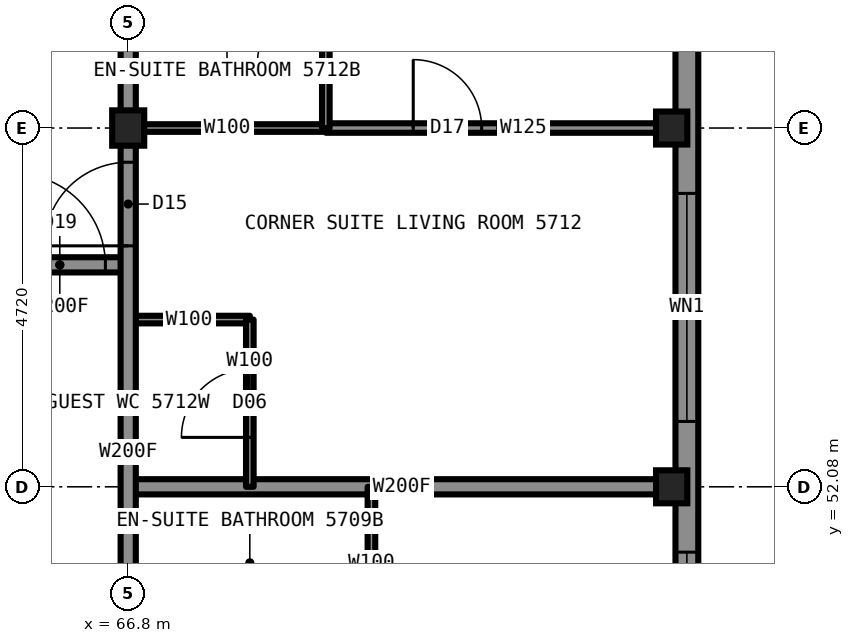
"""IFC4 building model, lengths in metres.
Left out: names, types, materials, properties, quantities, classifications, styles, units other than length and angle.
Written with IfcOpenShell. Run it as: python <this file> out.ifc"""

import sys

from ifc_helpers import new_model, si_unit, direction, frame, frame_2d, origin, origin_2d, place, context, subcontext, project, spatial, rectangle, i_section, extrude, element, fill, save


model = new_model("IFC4")
c1 = context("Model", 3, precision=1e-05, world=origin(), true_north=direction((0.0, 1.0)))
c2 = subcontext(c1, "Body", "Model", "MODEL_VIEW")
j1 = project(units=[si_unit("LENGTHUNIT", "METRE"), si_unit("PLANEANGLEUNIT", "RADIAN")], contexts=[c1])
p1 = place(None, origin())
s1 = spatial("IfcSite", under=j1, at=p1, CompositionType="ELEMENT")
p2 = place(p1, origin())
s2 = spatial("IfcBuilding", under=s1, at=p2, CompositionType="ELEMENT")
p3 = place(p2, frame((0.0, 0.0, 203.8)))
s3 = spatial("IfcBuildingStorey", under=s2, at=p3, CompositionType="ELEMENT", Elevation=203.8)
for number, where, z_axis, x_axis in (
    (1, (73.95, 52.08, 0.0), (0.0, 0.0, 1.0), (1.0, 0.0, 0.0)),
    (2, (73.95, 56.8, 0.0), (0.0, 0.0, 1.0), (1.0, 0.0, 0.0)),
):
    element("IfcColumn", number, at=place(p3, frame(where, z_axis=z_axis, x_axis=x_axis)), inside=s3, PredefinedType="COLUMN", context=c2, shape_type="SweptSolid", body=[
        extrude(i_section(OverallWidth=0.411, OverallDepth=0.434, WebThickness=0.036, FlangeThickness=0.057, at=origin_2d()), origin(), (0.0, 0.0, 1.0), 3.5),
    ])
p4 = place(p3, frame((66.8, 56.8, 0.0), z_axis=(0.0, 0.0, 1.0), x_axis=(1.0, 0.0, 0.0)))
e3 = element("IfcColumn", 3, at=p4, inside=s3, PredefinedType="COLUMN", context=c2, shape_type="SweptSolid", body=[
    extrude(i_section(OverallWidth=0.422, OverallDepth=0.465, WebThickness=0.045, FlangeThickness=0.073, at=origin_2d()), origin(), (0.0, 0.0, 1.0), 3.5),
])
p5 = place(p3, frame((65.0, 55.0, 0.0), z_axis=(0.0, 0.0, 1.0), x_axis=(1.0, 0.0, 0.0)))
e4 = element("IfcWall", 4, at=p5, inside=s3, PredefinedType="PARTITIONING", context=c2, shape_type="SweptSolid", body=[
    extrude(rectangle(XDim=1.8, YDim=0.2, at=frame_2d((0.9, 0.0))), origin(), (0.0, 0.0, 1.0), 3.33),
])
p6 = place(p5, frame((0.3, 0.0, 0.0)))
e5 = element("IfcOpeningElement", 5, at=p6, cuts=e4, PredefinedType="OPENING", context=c2, shape_type="SweptSolid", body=[
    extrude(rectangle(XDim=1.2, YDim=2.2, at=frame_2d((0.6, 1.1))), frame((0.0, 0.11, 0.0), z_axis=(0.0, -1.0, 0.0), x_axis=(1.0, 0.0, 0.0)), (0.0, 0.0, 1.0), 0.22),
])
p7 = place(p3, frame((66.8, 56.8, 0.0), z_axis=(0.0, 0.0, 1.0), x_axis=(1.0, 0.0, 0.0)))
e6 = element("IfcWall", 6, at=p7, inside=s3, PredefinedType="PARTITIONING", context=c2, shape_type="SweptSolid", body=[
    extrude(rectangle(XDim=2.6, YDim=0.1, at=frame_2d((1.3, 0.0))), origin(), (0.0, 0.0, 1.0), 2.573),
])
p8 = place(p3, frame((69.4, 56.8, 0.0), z_axis=(0.0, 0.0, 1.0), x_axis=(1.0, 0.0, 0.0)))
e7 = element("IfcWall", 7, at=p8, inside=s3, PredefinedType="PARTITIONING", context=c2, shape_type="SweptSolid", body=[
    extrude(rectangle(XDim=4.6, YDim=0.125, at=frame_2d((2.3, 0.0))), origin(), (0.0, 0.0, 1.0), 2.573),
])
p9 = place(p8, frame((1.15, 0.0, 0.0)))
e8 = element("IfcOpeningElement", 8, at=p9, cuts=e7, PredefinedType="OPENING", context=c2, shape_type="SweptSolid", body=[
    extrude(rectangle(XDim=0.9, YDim=2.2, at=frame_2d((0.45, 1.1))), frame((0.0, 0.073, 0.0), z_axis=(0.0, -1.0, 0.0), x_axis=(1.0, 0.0, 0.0)), (0.0, 0.0, 1.0), 0.145),
])
p10 = place(p3, frame((66.8, 52.08, 0.0), z_axis=(0.0, 0.0, 1.0), x_axis=(1.0, 0.0, 0.0)))
e9 = element("IfcWall", 9, at=p10, inside=s3, PredefinedType="PARTITIONING", context=c2, shape_type="SweptSolid", body=[
    extrude(rectangle(XDim=7.2, YDim=0.2, at=frame_2d((3.6, 0.0))), origin(), (0.0, 0.0, 1.0), 2.573),
])
p11 = place(p3, frame((66.8, 54.28, 0.0), z_axis=(0.0, 0.0, 1.0), x_axis=(1.0, 0.0, 0.0)))
e10 = element("IfcWall", 10, at=p11, inside=s3, PredefinedType="PARTITIONING", context=c2, shape_type="SweptSolid", body=[
    extrude(rectangle(XDim=1.6, YDim=0.1, at=frame_2d((0.8, 0.0))), origin(), (0.0, 0.0, 1.0), 3.33),
])
p12 = place(p3, frame((66.8, 33.2, 0.0), z_axis=(0.0, 0.0, 1.0), x_axis=(0.0, 1.0, 0.0)))
e11 = element("IfcWall", 11, at=p12, inside=s3, PredefinedType="PARTITIONING", context=c2, shape_type="SweptSolid", body=[
    extrude(rectangle(XDim=23.58, YDim=0.2, at=frame_2d((11.79, 0.0))), origin(), (0.0, 0.0, 1.0), 3.33),
])
p13 = place(p12, frame((6.98, 0.0, 0.0)))
e12 = element("IfcOpeningElement", 12, at=p13, cuts=e11, PredefinedType="OPENING", context=c2, shape_type="SweptSolid", body=[
    extrude(rectangle(XDim=1.0, YDim=2.2, at=frame_2d((0.5, 1.1))), frame((0.0, 0.11, 0.0), z_axis=(0.0, -1.0, 0.0), x_axis=(1.0, 0.0, 0.0)), (0.0, 0.0, 1.0), 0.22),
])
p14 = place(p12, frame((11.7, 0.0, 0.0)))
e13 = element("IfcOpeningElement", 13, at=p14, cuts=e11, PredefinedType="OPENING", context=c2, shape_type="SweptSolid", body=[
    extrude(rectangle(XDim=1.0, YDim=2.2, at=frame_2d((0.5, 1.1))), frame((0.0, 0.11, 0.0), z_axis=(0.0, -1.0, 0.0), x_axis=(1.0, 0.0, 0.0)), (0.0, 0.0, 1.0), 0.22),
])
p15 = place(p12, frame((15.62, 0.0, 0.0)))
e14 = element("IfcOpeningElement", 14, at=p15, cuts=e11, PredefinedType="OPENING", context=c2, shape_type="SweptSolid", body=[
    extrude(rectangle(XDim=1.0, YDim=2.2, at=frame_2d((0.5, 1.1))), frame((0.0, 0.11, 0.0), z_axis=(0.0, -1.0, 0.0), x_axis=(1.0, 0.0, 0.0)), (0.0, 0.0, 1.0), 0.22),
])
p16 = place(p12, frame((22.05, 0.0, 0.0)))
e15 = element("IfcOpeningElement", 15, at=p16, cuts=e11, PredefinedType="OPENING", context=c2, shape_type="SweptSolid", body=[
    extrude(rectangle(XDim=1.1, YDim=2.2, at=frame_2d((0.55, 1.1))), frame((0.0, 0.11, 0.0), z_axis=(0.0, -1.0, 0.0), x_axis=(1.0, 0.0, 0.0)), (0.0, 0.0, 1.0), 0.22),
])
p17 = place(p12, frame((0.65, 0.0, 0.0)))
e16 = element("IfcOpeningElement", 16, at=p17, cuts=e11, PredefinedType="OPENING", context=c2, shape_type="SweptSolid", body=[
    extrude(rectangle(XDim=1.1, YDim=2.2, at=frame_2d((0.55, 1.1))), frame((0.0, 0.11, 0.0), z_axis=(0.0, -1.0, 0.0), x_axis=(1.0, 0.0, 0.0)), (0.0, 0.0, 1.0), 0.22),
])
p18 = place(p3, frame((68.4, 52.08, 0.0), z_axis=(0.0, 0.0, 1.0), x_axis=(0.0, 1.0, 0.0)))
e17 = element("IfcWall", 17, at=p18, inside=s3, PredefinedType="PARTITIONING", context=c2, shape_type="SweptSolid", body=[
    extrude(rectangle(XDim=2.2, YDim=0.1, at=frame_2d((1.1, 0.0))), origin(), (0.0, 0.0, 1.0), 3.33),
])
p19 = place(p18, frame((0.65, 0.0, 0.0)))
e18 = element("IfcOpeningElement", 18, at=p19, cuts=e17, PredefinedType="OPENING", context=c2, shape_type="SweptSolid", body=[
    extrude(rectangle(XDim=0.9, YDim=2.1, at=frame_2d((0.45, 1.05))), frame((0.0, 0.06, 0.0), z_axis=(0.0, -1.0, 0.0), x_axis=(1.0, 0.0, 0.0)), (0.0, 0.0, 1.0), 0.12),
])
p20 = place(p3, frame((69.4, 56.8, 0.0), z_axis=(0.0, 0.0, 1.0), x_axis=(0.0, 1.0, 0.0)))
e19 = element("IfcWall", 19, at=p20, inside=s3, PredefinedType="PARTITIONING", context=c2, shape_type="SweptSolid", body=[
    extrude(rectangle(XDim=2.6, YDim=0.1, at=frame_2d((1.3, 0.0))), origin(), (0.0, 0.0, 1.0), 3.33),
])
p21 = place(p20, frame((0.85, 0.0, 0.0)))
e20 = element("IfcOpeningElement", 20, at=p21, cuts=e19, PredefinedType="OPENING", context=c2, shape_type="SweptSolid", body=[
    extrude(rectangle(XDim=0.9, YDim=2.1, at=frame_2d((0.45, 1.05))), frame((0.0, 0.06, 0.0), z_axis=(0.0, -1.0, 0.0), x_axis=(1.0, 0.0, 0.0)), (0.0, 0.0, 1.0), 0.12),
])
p22 = place(p3, frame((70.0, 50.08, 0.0), z_axis=(0.0, 0.0, 1.0), x_axis=(0.0, 1.0, 0.0)))
e21 = element("IfcWall", 21, at=p22, inside=s3, PredefinedType="PARTITIONING", context=c2, shape_type="SweptSolid", body=[
    extrude(rectangle(XDim=2.0, YDim=0.1, at=frame_2d((1.0, 0.0))), origin(), (0.0, 0.0, 1.0), 3.33),
])
p23 = place(p3, frame((74.15, 31.2, 0.0), z_axis=(0.0, 0.0, 1.0), x_axis=(0.0, 1.0, 0.0)))
e22 = element("IfcWall", 22, at=p23, inside=s3, PredefinedType="SOLIDWALL", context=c2, shape_type="SweptSolid", body=[
    extrude(rectangle(XDim=27.6, YDim=0.3, at=frame_2d((13.8, 0.0))), origin(), (0.0, 0.0, 1.0), 2.83),
])
p24 = place(p23, frame((2.86, 0.0, 0.3)))
e23 = element("IfcOpeningElement", 23, at=p24, cuts=e22, PredefinedType="OPENING", context=c2, shape_type="SweptSolid", body=[
    extrude(rectangle(XDim=0.7, YDim=1.2, at=frame_2d((0.35, 0.6))), frame((0.0, 0.16, 0.0), z_axis=(0.0, -1.0, 0.0), x_axis=(1.0, 0.0, 0.0)), (0.0, 0.0, 1.0), 0.32),
])
p25 = place(p23, frame((7.58, 0.0, 0.3)))
e24 = element("IfcOpeningElement", 24, at=p25, cuts=e22, PredefinedType="OPENING", context=c2, shape_type="SweptSolid", body=[
    extrude(rectangle(XDim=3.0, YDim=2.0, at=frame_2d((1.5, 1.0))), frame((0.0, 0.16, 0.0), z_axis=(0.0, -1.0, 0.0), x_axis=(1.0, 0.0, 0.0)), (0.0, 0.0, 1.0), 0.32),
])
p26 = place(p23, frame((12.3, 0.0, 0.3)))
e25 = element("IfcOpeningElement", 25, at=p26, cuts=e22, PredefinedType="OPENING", context=c2, shape_type="SweptSolid", body=[
    extrude(rectangle(XDim=3.0, YDim=2.0, at=frame_2d((1.5, 1.0))), frame((0.0, 0.16, 0.0), z_axis=(0.0, -1.0, 0.0), x_axis=(1.0, 0.0, 0.0)), (0.0, 0.0, 1.0), 0.32),
])
p27 = place(p23, frame((17.02, 0.0, 0.3)))
e26 = element("IfcOpeningElement", 26, at=p27, cuts=e22, PredefinedType="OPENING", context=c2, shape_type="SweptSolid", body=[
    extrude(rectangle(XDim=3.0, YDim=2.0, at=frame_2d((1.5, 1.0))), frame((0.0, 0.16, 0.0), z_axis=(0.0, -1.0, 0.0), x_axis=(1.0, 0.0, 0.0)), (0.0, 0.0, 1.0), 0.32),
])
p28 = place(p23, frame((23.99, 0.0, 0.3)))
e27 = element("IfcOpeningElement", 27, at=p28, cuts=e22, PredefinedType="OPENING", context=c2, shape_type="SweptSolid", body=[
    extrude(rectangle(XDim=0.7, YDim=1.2, at=frame_2d((0.35, 0.6))), frame((0.0, 0.16, 0.0), z_axis=(0.0, -1.0, 0.0), x_axis=(1.0, 0.0, 0.0)), (0.0, 0.0, 1.0), 0.32),
])
p29 = place(p3, frame((66.8, 56.78, 0.0), z_axis=(0.0, 0.0, 1.0), x_axis=(0.0, 1.0, 0.0)))
e28 = element("IfcWall", 28, at=p29, inside=s3, PredefinedType="PARTITIONING", context=c2, shape_type="SweptSolid", body=[
    extrude(rectangle(XDim=2.62, YDim=0.2, at=frame_2d((1.31, 0.0))), origin(), (0.0, 0.0, 1.0), 2.573),
])
p30 = place(p6, origin())
e29 = element("IfcDoor", 29, at=p30, inside=s3, OperationType="SINGLE_SWING_LEFT", PredefinedType="DOOR", context=c2, shape_type="SweptSolid", body=[
    extrude(rectangle(XDim=1.2, YDim=2.2, at=frame_2d((0.6, 1.1))), frame((0.0, 0.025, 0.0), z_axis=(0.0, -1.0, 0.0), x_axis=(1.0, 0.0, 0.0)), (0.0, 0.0, 1.0), 0.05),
])
fill(e5, e29)
p31 = place(p16, origin())
e30 = element("IfcDoor", 30, at=p31, inside=s3, OperationType="SINGLE_SWING_LEFT", PredefinedType="DOOR", context=c2, shape_type="SweptSolid", body=[
    extrude(rectangle(XDim=1.1, YDim=2.2, at=frame_2d((0.55, 1.1))), frame((0.0, 0.025, 0.0), z_axis=(0.0, -1.0, 0.0), x_axis=(1.0, 0.0, 0.0)), (0.0, 0.0, 1.0), 0.05),
])
fill(e15, e30)
p32 = place(p21, origin())
e31 = element("IfcDoor", 31, at=p32, inside=s3, OperationType="SINGLE_SWING_RIGHT", PredefinedType="DOOR", context=c2, shape_type="SweptSolid", body=[
    extrude(rectangle(XDim=0.9, YDim=2.1, at=frame_2d((0.45, 1.05))), frame((0.0, 0.025, 0.0), z_axis=(0.0, -1.0, 0.0), x_axis=(1.0, 0.0, 0.0)), (0.0, 0.0, 1.0), 0.05),
])
fill(e20, e31)
p33 = place(p9, origin())
e32 = element("IfcDoor", 32, at=p33, inside=s3, OperationType="SINGLE_SWING_LEFT", PredefinedType="DOOR", context=c2, shape_type="SweptSolid", body=[
    extrude(rectangle(XDim=0.9, YDim=2.2, at=frame_2d((0.45, 1.1))), frame((0.0, 0.025, 0.0), z_axis=(0.0, -1.0, 0.0), x_axis=(1.0, 0.0, 0.0)), (0.0, 0.0, 1.0), 0.05),
])
fill(e8, e32)
p34 = place(p19, origin())
e33 = element("IfcDoor", 33, at=p34, inside=s3, OperationType="SINGLE_SWING_LEFT", PredefinedType="DOOR", context=c2, shape_type="SweptSolid", body=[
    extrude(rectangle(XDim=0.9, YDim=2.1, at=frame_2d((0.45, 1.05))), frame((0.0, 0.025, 0.0), z_axis=(0.0, -1.0, 0.0), x_axis=(1.0, 0.0, 0.0)), (0.0, 0.0, 1.0), 0.05),
])
fill(e18, e33)
p35 = place(p27, origin())
e34 = element("IfcWindow", 34, at=p35, inside=s3, PartitioningType="SINGLE_PANEL", PredefinedType="WINDOW", context=c2, shape_type="SweptSolid", body=[
    extrude(rectangle(XDim=3.0, YDim=2.0, at=frame_2d((1.5, 1.0))), frame((0.0, 0.13, 0.0), z_axis=(0.0, -1.0, 0.0), x_axis=(1.0, 0.0, 0.0)), (0.0, 0.0, 1.0), 0.06),
])
fill(e26, e34)
p36 = place(p28, origin())
e35 = element("IfcWindow", 35, at=p36, inside=s3, PartitioningType="SINGLE_PANEL", PredefinedType="WINDOW", context=c2, shape_type="SweptSolid", body=[
    extrude(rectangle(XDim=0.7, YDim=1.2, at=frame_2d((0.35, 0.6))), frame((0.0, 0.13, 0.0), z_axis=(0.0, -1.0, 0.0), x_axis=(1.0, 0.0, 0.0)), (0.0, 0.0, 1.0), 0.06),
])
fill(e27, e35)
save(model, sys.argv[1])
